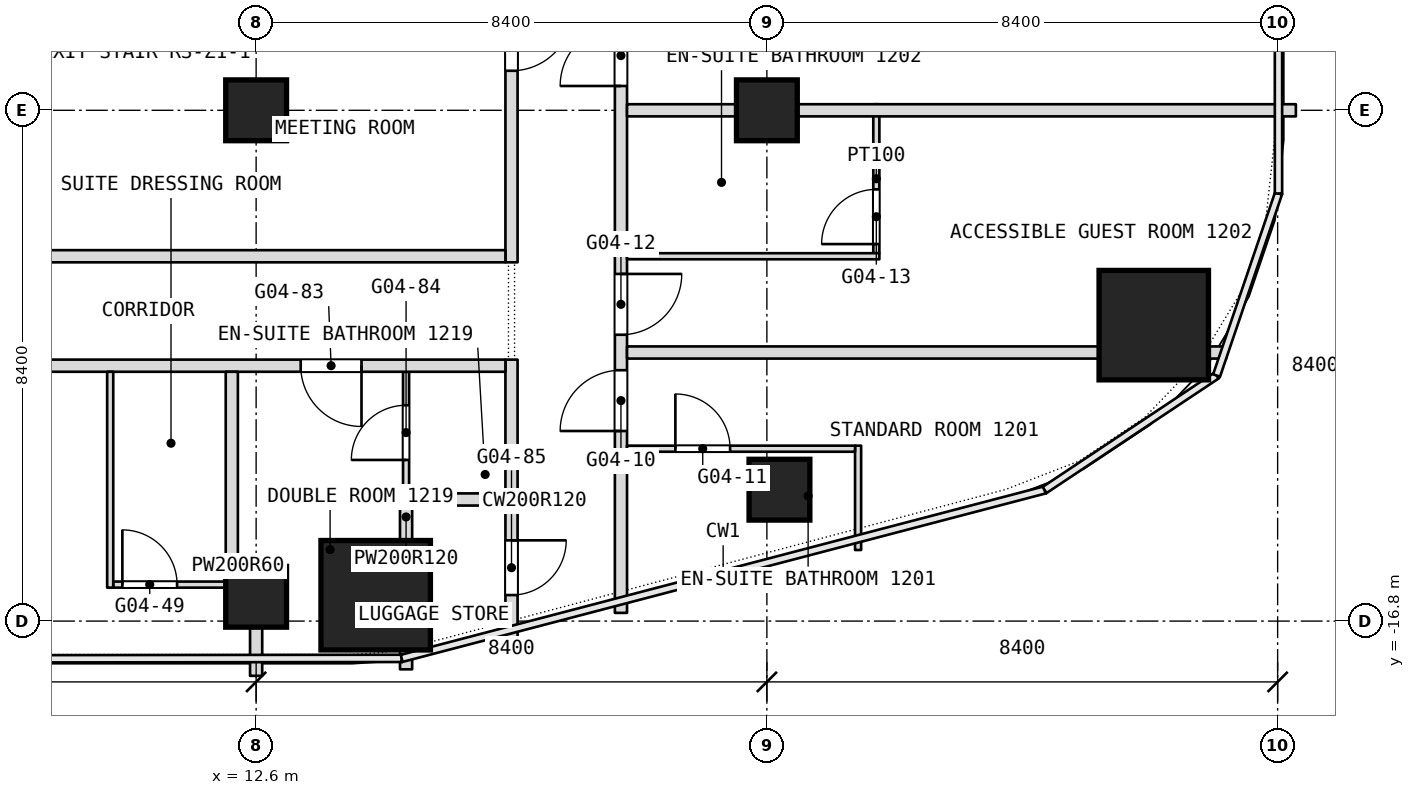
"""IFC4 building model, lengths in metres.
Left out: names, types, materials, properties, quantities, classifications, styles, units other than length and angle.
Written with IfcOpenShell. Run it as: python <this file> out.ifc"""

import sys

from ifc_helpers import new_model, si_unit, direction, frame, frame_2d, origin, origin_2d, place, context, subcontext, project, spatial, rectangle, extrude, element, fill, save


model = new_model("IFC4")
c1 = context("Model", 3, precision=1e-05, world=origin(), true_north=direction((0.0, 1.0)))
c2 = subcontext(c1, "Body", "Model", "MODEL_VIEW")
j1 = project(units=[si_unit("LENGTHUNIT", "METRE"), si_unit("PLANEANGLEUNIT", "RADIAN")], contexts=[c1])
p1 = place(None, origin())
s1 = spatial("IfcSite", under=j1, at=p1, CompositionType="ELEMENT")
p2 = place(p1, origin())
s2 = spatial("IfcBuilding", under=s1, at=p2, CompositionType="ELEMENT")
p3 = place(p2, frame((0.0, 0.0, 58.1)))
s3 = spatial("IfcBuildingStorey", under=s2, at=p3, CompositionType="ELEMENT", Elevation=58.1)
for number, where, z_axis, x_axis in (
    (1, (14.566, -16.375, 0.0), (0.0, 0.0, 1.0), (1.0, 0.0, 0.0)),
    (2, (27.363, -11.933, 0.0), (0.0, 0.0, 1.0), (1.0, 0.0, 0.0)),
):
    element("IfcColumn", number, at=place(p3, frame(where, z_axis=z_axis, x_axis=x_axis)), inside=s3, PredefinedType="COLUMN", context=c2, shape_type="SweptSolid", body=[
        extrude(rectangle(XDim=1.8, YDim=1.8, at=origin_2d()), origin(), (0.0, 0.0, 1.0), 3.6),
    ])
for number, where, z_axis, x_axis in (
    (3, (12.6, -8.4, 0.0), (0.0, 0.0, 1.0), (1.0, 0.0, 0.0)),
    (4, (21.0, -8.4, 0.0), (0.0, 0.0, 1.0), (1.0, 0.0, 0.0)),
    (5, (21.207, -14.639, 0.0), (0.0, 0.0, 1.0), (1.0, 0.0, 0.0)),
    (6, (12.6, -16.4, 0.0), (0.0, 0.0, 1.0), (1.0, 0.0, 0.0)),
):
    element("IfcColumn", number, at=place(p3, frame(where, z_axis=z_axis, x_axis=x_axis)), inside=s3, PredefinedType="COLUMN", context=c2, shape_type="SweptSolid", body=[
        extrude(rectangle(XDim=1.0, YDim=1.0, at=origin_2d()), origin(), (0.0, 0.0, 1.0), 3.6),
    ])
p4 = place(p3, frame((22.8, -10.75, 0.0), z_axis=(0.0, 0.0, 1.0), x_axis=(0.0, 1.0, 0.0)))
e7 = element("IfcWall", 7, at=p4, inside=s3, PredefinedType="PARTITIONING", context=c2, shape_type="SweptSolid", body=[
    extrude(rectangle(XDim=2.45, YDim=0.1, at=frame_2d((1.225, 0.0))), origin(), (0.0, 0.0, 1.0), 3.34),
])
p5 = place(p4, frame((0.15, 0.0, 0.0)))
e8 = element("IfcOpeningElement", 8, at=p5, cuts=e7, PredefinedType="OPENING", context=c2, shape_type="SweptSolid", body=[
    extrude(rectangle(XDim=0.9, YDim=2.1, at=frame_2d((0.45, 1.05))), frame((0.0, 0.05, 0.0), z_axis=(0.0, -1.0, 0.0), x_axis=(1.0, 0.0, 0.0)), (0.0, 0.0, 1.0), 0.1),
])
p6 = place(p3, frame((22.5, -15.631, 0.0), z_axis=(0.0, 0.0, 1.0), x_axis=(0.0, 1.0, 0.0)))
e9 = element("IfcWall", 9, at=p6, inside=s3, PredefinedType="PARTITIONING", context=c2, shape_type="SweptSolid", body=[
    extrude(rectangle(XDim=1.716, YDim=0.1, at=frame_2d((0.858, 0.0))), origin(), (0.0, 0.0, 1.0), 3.34),
])
p7 = place(p3, frame((18.6, -16.665, 0.0), z_axis=(0.0, 0.0, 1.0), x_axis=(0.0, 1.0, 0.0)))
e10 = element("IfcWall", 10, at=p7, inside=s3, PredefinedType="PARTITIONING", context=c2, shape_type="SweptSolid", body=[
    extrude(rectangle(XDim=50.205, YDim=0.2, at=frame_2d((25.103, 0.0))), origin(), (0.0, 0.0, 1.0), 3.34),
])
p8 = place(p7, frame((2.991, 0.0, 0.0)))
e11 = element("IfcOpeningElement", 11, at=p8, cuts=e10, PredefinedType="OPENING", context=c2, shape_type="SweptSolid", body=[
    extrude(rectangle(XDim=1.0, YDim=2.1, at=frame_2d((0.5, 1.05))), frame((0.0, 0.1, 0.0), z_axis=(0.0, -1.0, 0.0), x_axis=(1.0, 0.0, 0.0)), (0.0, 0.0, 1.0), 0.2),
])
p9 = place(p7, frame((4.574, 0.0, 0.0)))
e12 = element("IfcOpeningElement", 12, at=p9, cuts=e10, PredefinedType="OPENING", context=c2, shape_type="SweptSolid", body=[
    extrude(rectangle(XDim=1.0, YDim=2.1, at=frame_2d((0.5, 1.05))), frame((0.0, 0.1, 0.0), z_axis=(0.0, -1.0, 0.0), x_axis=(1.0, 0.0, 0.0)), (0.0, 0.0, 1.0), 0.2),
])
p10 = place(p7, frame((8.665, 0.0, 0.0)))
e13 = element("IfcOpeningElement", 13, at=p10, cuts=e10, PredefinedType="OPENING", context=c2, shape_type="SweptSolid", body=[
    extrude(rectangle(XDim=1.0, YDim=2.1, at=frame_2d((0.5, 1.05))), frame((0.0, 0.1, 0.0), z_axis=(0.0, -1.0, 0.0), x_axis=(1.0, 0.0, 0.0)), (0.0, 0.0, 1.0), 0.2),
])
p11 = place(p7, frame((15.265, 0.0, 0.0)))
e14 = element("IfcOpeningElement", 14, at=p11, cuts=e10, PredefinedType="OPENING", context=c2, shape_type="SweptSolid", body=[
    extrude(rectangle(XDim=1.0, YDim=2.1, at=frame_2d((0.5, 1.05))), frame((0.0, 0.1, 0.0), z_axis=(0.0, -1.0, 0.0), x_axis=(1.0, 0.0, 0.0)), (0.0, 0.0, 1.0), 0.2),
])
p12 = place(p7, frame((19.465, 0.0, 0.0)))
e15 = element("IfcOpeningElement", 15, at=p12, cuts=e10, PredefinedType="OPENING", context=c2, shape_type="SweptSolid", body=[
    extrude(rectangle(XDim=1.0, YDim=2.1, at=frame_2d((0.5, 1.05))), frame((0.0, 0.1, 0.0), z_axis=(0.0, -1.0, 0.0), x_axis=(1.0, 0.0, 0.0)), (0.0, 0.0, 1.0), 0.2),
])
p13 = place(p7, frame((21.265, 0.0, 0.0)))
e16 = element("IfcOpeningElement", 16, at=p13, cuts=e10, PredefinedType="OPENING", context=c2, shape_type="SweptSolid", body=[
    extrude(rectangle(XDim=1.0, YDim=2.1, at=frame_2d((0.5, 1.05))), frame((0.0, 0.1, 0.0), z_axis=(0.0, -1.0, 0.0), x_axis=(1.0, 0.0, 0.0)), (0.0, 0.0, 1.0), 0.2),
])
p14 = place(p7, frame((28.365, 0.0, 0.0)))
e17 = element("IfcOpeningElement", 17, at=p14, cuts=e10, PredefinedType="OPENING", context=c2, shape_type="SweptSolid", body=[
    extrude(rectangle(XDim=1.8, YDim=2.1, at=frame_2d((0.9, 1.05))), frame((0.0, 0.1, 0.0), z_axis=(0.0, -1.0, 0.0), x_axis=(1.0, 0.0, 0.0)), (0.0, 0.0, 1.0), 0.2),
])
p15 = place(p7, frame((37.165, 0.0, 0.0)))
e18 = element("IfcOpeningElement", 18, at=p15, cuts=e10, PredefinedType="OPENING", context=c2, shape_type="SweptSolid", body=[
    extrude(rectangle(XDim=1.1, YDim=2.1, at=frame_2d((0.55, 1.05))), frame((0.0, 0.1, 0.0), z_axis=(0.0, -1.0, 0.0), x_axis=(1.0, 0.0, 0.0)), (0.0, 0.0, 1.0), 0.2),
])
p16 = place(p7, frame((43.415, 0.0, 0.0)))
e19 = element("IfcOpeningElement", 19, at=p16, cuts=e10, PredefinedType="OPENING", context=c2, shape_type="SweptSolid", body=[
    extrude(rectangle(XDim=1.1, YDim=2.1, at=frame_2d((0.55, 1.05))), frame((0.0, 0.1, 0.0), z_axis=(0.0, -1.0, 0.0), x_axis=(1.0, 0.0, 0.0)), (0.0, 0.0, 1.0), 0.2),
])
p17 = place(p3, frame((16.8, -17.143, 0.0), z_axis=(0.0, 0.0, 1.0), x_axis=(0.0, 1.0, 0.0)))
e20 = element("IfcWall", 20, at=p17, inside=s3, PredefinedType="PARTITIONING", context=c2, shape_type="SweptSolid", body=[
    extrude(rectangle(XDim=4.643, YDim=0.2, at=frame_2d((2.322, 0.0))), origin(), (0.0, 0.0, 1.0), 3.34),
])
p18 = place(p17, frame((0.771, 0.0, 0.0)))
e21 = element("IfcOpeningElement", 21, at=p18, cuts=e20, PredefinedType="OPENING", context=c2, shape_type="SweptSolid", body=[
    extrude(rectangle(XDim=0.9, YDim=2.1, at=frame_2d((0.45, 1.05))), frame((0.0, 0.1, 0.0), z_axis=(0.0, -1.0, 0.0), x_axis=(1.0, 0.0, 0.0)), (0.0, 0.0, 1.0), 0.2),
])
p19 = place(p3, frame((16.8, -10.9, 0.0), z_axis=(0.0, 0.0, 1.0), x_axis=(0.0, 1.0, 0.0)))
e22 = element("IfcWall", 22, at=p19, inside=s3, PredefinedType="PARTITIONING", context=c2, shape_type="SweptSolid", body=[
    extrude(rectangle(XDim=7.3, YDim=0.2, at=frame_2d((3.65, 0.0))), origin(), (0.0, 0.0, 1.0), 3.34),
])
p20 = place(p19, frame((3.15, 0.0, 0.0)))
e23 = element("IfcOpeningElement", 23, at=p20, cuts=e22, PredefinedType="OPENING", context=c2, shape_type="SweptSolid", body=[
    extrude(rectangle(XDim=1.0, YDim=2.1, at=frame_2d((0.5, 1.05))), frame((0.0, 0.1, 0.0), z_axis=(0.0, -1.0, 0.0), x_axis=(1.0, 0.0, 0.0)), (0.0, 0.0, 1.0), 0.2),
])
p21 = place(p3, frame((10.25, -16.2, 0.0), z_axis=(0.0, 0.0, 1.0), x_axis=(1.0, 0.0, 0.0)))
e24 = element("IfcWall", 24, at=p21, inside=s3, PredefinedType="PARTITIONING", context=c2, shape_type="SweptSolid", body=[
    extrude(rectangle(XDim=2.45, YDim=0.1, at=frame_2d((1.225, 0.0))), origin(), (0.0, 0.0, 1.0), 3.34),
])
p22 = place(p21, frame((0.15, 0.0, 0.0)))
e25 = element("IfcOpeningElement", 25, at=p22, cuts=e24, PredefinedType="OPENING", context=c2, shape_type="SweptSolid", body=[
    extrude(rectangle(XDim=0.9, YDim=2.1, at=frame_2d((0.45, 1.05))), frame((0.0, 0.05, 0.0), z_axis=(0.0, -1.0, 0.0), x_axis=(1.0, 0.0, 0.0)), (0.0, 0.0, 1.0), 0.1),
])
p23 = place(p3, frame((12.1, -15.9, 0.0), z_axis=(0.0, 0.0, 1.0), x_axis=(1.0, 0.0, 0.0)))
e26 = element("IfcWall", 26, at=p23, inside=s3, PredefinedType="PARTITIONING", context=c2, shape_type="SweptSolid", body=[
    extrude(rectangle(XDim=0.4, YDim=0.2, at=frame_2d((0.2, 0.0))), origin(), (0.0, 0.0, 1.0), 3.34),
])
p24 = place(p3, frame((15.066, -17.593, 0.0), z_axis=(0.0, 0.0, 1.0), x_axis=(0.0, 1.0, 0.0)))
e27 = element("IfcWall", 27, at=p24, inside=s3, PredefinedType="PARTITIONING", context=c2, shape_type="SweptSolid", body=[
    extrude(rectangle(XDim=0.318, YDim=0.2, at=frame_2d((0.159, 0.0))), origin(), (0.0, 0.0, 1.0), 3.34),
])
p25 = place(p3, frame((15.066, -15.475, 0.0), z_axis=(0.0, 0.0, 1.0), x_axis=(0.0, 1.0, 0.0)))
e28 = element("IfcWall", 28, at=p25, inside=s3, PredefinedType="PARTITIONING", context=c2, shape_type="SweptSolid", body=[
    extrude(rectangle(XDim=0.775, YDim=0.2, at=frame_2d((0.388, 0.0))), origin(), (0.0, 0.0, 1.0), 3.34),
])
p26 = place(p3, frame((15.066, -14.9, 0.0), z_axis=(0.0, 0.0, 1.0), x_axis=(0.0, 1.0, 0.0)))
e29 = element("IfcWall", 29, at=p26, inside=s3, PredefinedType="PARTITIONING", context=c2, shape_type="SweptSolid", body=[
    extrude(rectangle(XDim=2.2, YDim=0.1, at=frame_2d((1.1, 0.0))), origin(), (0.0, 0.0, 1.0), 3.34),
])
p27 = place(p26, frame((0.75, 0.0, 0.0)))
e30 = element("IfcOpeningElement", 30, at=p27, cuts=e29, PredefinedType="OPENING", context=c2, shape_type="SweptSolid", body=[
    extrude(rectangle(XDim=0.9, YDim=2.1, at=frame_2d((0.45, 1.05))), frame((0.0, 0.05, 0.0), z_axis=(0.0, -1.0, 0.0), x_axis=(1.0, 0.0, 0.0)), (0.0, 0.0, 1.0), 0.1),
])
p28 = place(p3, frame((15.116, -14.8, 0.0), z_axis=(0.0, 0.0, 1.0), x_axis=(1.0, 0.0, 0.0)))
e31 = element("IfcWall", 31, at=p28, inside=s3, PredefinedType="PARTITIONING", context=c2, shape_type="SweptSolid", body=[
    extrude(rectangle(XDim=1.584, YDim=0.2, at=frame_2d((0.792, 0.0))), origin(), (0.0, 0.0, 1.0), 3.34),
])
p29 = place(p3, frame((18.7, -13.965, 0.0), z_axis=(0.0, 0.0, 1.0), x_axis=(1.0, 0.0, 0.0)))
e32 = element("IfcWall", 32, at=p29, inside=s3, PredefinedType="PARTITIONING", context=c2, shape_type="SweptSolid", body=[
    extrude(rectangle(XDim=3.75, YDim=0.1, at=frame_2d((1.875, 0.0))), origin(), (0.0, 0.0, 1.0), 3.34),
])
p30 = place(p29, frame((0.795, 0.0, 0.0)))
e33 = element("IfcOpeningElement", 33, at=p30, cuts=e32, PredefinedType="OPENING", context=c2, shape_type="SweptSolid", body=[
    extrude(rectangle(XDim=0.9, YDim=2.1, at=frame_2d((0.45, 1.05))), frame((0.0, 0.05, 0.0), z_axis=(0.0, -1.0, 0.0), x_axis=(1.0, 0.0, 0.0)), (0.0, 0.0, 1.0), 0.1),
])
p31 = place(p3, frame((12.6, -17.7, 0.0), z_axis=(0.0, 0.0, 1.0), x_axis=(0.0, 1.0, 0.0)))
e34 = element("IfcWall", 34, at=p31, inside=s3, PredefinedType="PARTITIONING", context=c2, shape_type="SweptSolid", body=[
    extrude(rectangle(XDim=1.9, YDim=0.2, at=frame_2d((0.95, 0.0))), origin(), (0.0, 0.0, 1.0), 3.34),
])
p32 = place(p3, frame((-16.7, -12.6, 0.0), z_axis=(0.0, 0.0, 1.0), x_axis=(1.0, 0.0, 0.0)))
e35 = element("IfcWall", 35, at=p32, inside=s3, PredefinedType="PARTITIONING", context=c2, shape_type="SweptSolid", body=[
    extrude(rectangle(XDim=33.4, YDim=0.2, at=frame_2d((16.7, 0.0))), origin(), (0.0, 0.0, 1.0), 3.34),
])
p33 = place(p32, frame((6.9, 0.0, 0.0)))
e36 = element("IfcOpeningElement", 36, at=p33, cuts=e35, PredefinedType="OPENING", context=c2, shape_type="SweptSolid", body=[
    extrude(rectangle(XDim=1.0, YDim=2.1, at=frame_2d((0.5, 1.05))), frame((0.0, 0.1, 0.0), z_axis=(0.0, -1.0, 0.0), x_axis=(1.0, 0.0, 0.0)), (0.0, 0.0, 1.0), 0.2),
])
p34 = place(p32, frame((8.7, 0.0, 0.0)))
e37 = element("IfcOpeningElement", 37, at=p34, cuts=e35, PredefinedType="OPENING", context=c2, shape_type="SweptSolid", body=[
    extrude(rectangle(XDim=1.0, YDim=2.1, at=frame_2d((0.5, 1.05))), frame((0.0, 0.1, 0.0), z_axis=(0.0, -1.0, 0.0), x_axis=(1.0, 0.0, 0.0)), (0.0, 0.0, 1.0), 0.2),
])
p35 = place(p32, frame((16.1, 0.0, 0.0)))
e38 = element("IfcOpeningElement", 38, at=p35, cuts=e35, PredefinedType="OPENING", context=c2, shape_type="SweptSolid", body=[
    extrude(rectangle(XDim=1.1, YDim=2.1, at=frame_2d((0.55, 1.05))), frame((0.0, 0.1, 0.0), z_axis=(0.0, -1.0, 0.0), x_axis=(1.0, 0.0, 0.0)), (0.0, 0.0, 1.0), 0.2),
])
p36 = place(p32, frame((24.6, 0.0, 0.0)))
e39 = element("IfcOpeningElement", 39, at=p36, cuts=e35, PredefinedType="OPENING", context=c2, shape_type="SweptSolid", body=[
    extrude(rectangle(XDim=1.1, YDim=2.1, at=frame_2d((0.55, 1.05))), frame((0.0, 0.1, 0.0), z_axis=(0.0, -1.0, 0.0), x_axis=(1.0, 0.0, 0.0)), (0.0, 0.0, 1.0), 0.2),
])
p37 = place(p32, frame((2.317, 0.0, 0.0)))
e40 = element("IfcOpeningElement", 40, at=p37, cuts=e35, PredefinedType="OPENING", context=c2, shape_type="SweptSolid", body=[
    extrude(rectangle(XDim=1.0, YDim=2.1, at=frame_2d((0.5, 1.05))), frame((0.0, 0.1, 0.0), z_axis=(0.0, -1.0, 0.0), x_axis=(1.0, 0.0, 0.0)), (0.0, 0.0, 1.0), 0.2),
])
p38 = place(p32, frame((30.033, 0.0, 0.0)))
e41 = element("IfcOpeningElement", 41, at=p38, cuts=e35, PredefinedType="OPENING", context=c2, shape_type="SweptSolid", body=[
    extrude(rectangle(XDim=1.0, YDim=2.1, at=frame_2d((0.5, 1.05))), frame((0.0, 0.1, 0.0), z_axis=(0.0, -1.0, 0.0), x_axis=(1.0, 0.0, 0.0)), (0.0, 0.0, 1.0), 0.2),
])
p39 = place(p3, frame((18.7, -12.383, 0.0), z_axis=(0.0, 0.0, 1.0), x_axis=(1.0, 0.0, 0.0)))
e42 = element("IfcWall", 42, at=p39, inside=s3, PredefinedType="PARTITIONING", context=c2, shape_type="SweptSolid", body=[
    extrude(rectangle(XDim=7.763, YDim=0.2, at=frame_2d((3.881, 0.0))), origin(), (0.0, 0.0, 1.0), 3.34),
])
p40 = place(p3, frame((28.263, -12.383, 0.0), z_axis=(0.0, 0.0, 1.0), x_axis=(1.0, 0.0, 0.0)))
e43 = element("IfcWall", 43, at=p40, inside=s3, PredefinedType="PARTITIONING", context=c2, shape_type="SweptSolid", body=[
    extrude(rectangle(XDim=0.29, YDim=0.2, at=frame_2d((0.145, 0.0))), origin(), (0.0, 0.0, 1.0), 3.34),
])
p41 = place(p3, frame((12.2, -15.8, 0.0), z_axis=(0.0, 0.0, 1.0), x_axis=(0.0, 1.0, 0.0)))
e44 = element("IfcWall", 44, at=p41, inside=s3, PredefinedType="PARTITIONING", context=c2, shape_type="SweptSolid", body=[
    extrude(rectangle(XDim=3.1, YDim=0.2, at=frame_2d((1.55, 0.0))), origin(), (0.0, 0.0, 1.0), 3.34),
])
p42 = place(p3, frame((-16.7, -10.8, 0.0), z_axis=(0.0, 0.0, 1.0), x_axis=(1.0, 0.0, 0.0)))
e45 = element("IfcWall", 45, at=p42, inside=s3, PredefinedType="PARTITIONING", context=c2, shape_type="SweptSolid", body=[
    extrude(rectangle(XDim=33.4, YDim=0.2, at=frame_2d((16.7, 0.0))), origin(), (0.0, 0.0, 1.0), 3.34),
])
p43 = place(p42, frame((5.7, 0.0, 0.0)))
e46 = element("IfcOpeningElement", 46, at=p43, cuts=e45, PredefinedType="OPENING", context=c2, shape_type="SweptSolid", body=[
    extrude(rectangle(XDim=1.0, YDim=2.1, at=frame_2d((0.5, 1.05))), frame((0.0, 0.1, 0.0), z_axis=(0.0, -1.0, 0.0), x_axis=(1.0, 0.0, 0.0)), (0.0, 0.0, 1.0), 0.2),
])
p44 = place(p42, frame((18.3, 0.0, 0.0)))
e47 = element("IfcOpeningElement", 47, at=p44, cuts=e45, PredefinedType="OPENING", context=c2, shape_type="SweptSolid", body=[
    extrude(rectangle(XDim=1.0, YDim=2.1, at=frame_2d((0.5, 1.05))), frame((0.0, 0.1, 0.0), z_axis=(0.0, -1.0, 0.0), x_axis=(1.0, 0.0, 0.0)), (0.0, 0.0, 1.0), 0.2),
])
p45 = place(p3, frame((18.7, -10.8, 0.0), z_axis=(0.0, 0.0, 1.0), x_axis=(1.0, 0.0, 0.0)))
e48 = element("IfcWall", 48, at=p45, inside=s3, PredefinedType="PARTITIONING", context=c2, shape_type="SweptSolid", body=[
    extrude(rectangle(XDim=4.15, YDim=0.1, at=frame_2d((2.075, 0.0))), origin(), (0.0, 0.0, 1.0), 3.34),
])
p46 = place(p3, frame((10.2, -16.25, 0.0), z_axis=(0.0, 0.0, 1.0), x_axis=(0.0, 1.0, 0.0)))
e49 = element("IfcWall", 49, at=p46, inside=s3, PredefinedType="PARTITIONING", context=c2, shape_type="SweptSolid", body=[
    extrude(rectangle(XDim=3.55, YDim=0.1, at=frame_2d((1.775, 0.0))), origin(), (0.0, 0.0, 1.0), 3.34),
])
p47 = place(p3, frame((18.7, -8.4, 0.0), z_axis=(0.0, 0.0, 1.0), x_axis=(1.0, 0.0, 0.0)))
e50 = element("IfcWall", 50, at=p47, inside=s3, PredefinedType="PARTITIONING", context=c2, shape_type="SweptSolid", body=[
    extrude(rectangle(XDim=11.0, YDim=0.2, at=frame_2d((5.5, 0.0))), origin(), (0.0, 0.0, 1.0), 2.84),
])
p48 = place(p5, origin())
e51 = element("IfcDoor", 51, at=p48, inside=s3, OperationType="SINGLE_SWING_LEFT", PredefinedType="DOOR", context=c2, shape_type="SweptSolid", body=[
    extrude(rectangle(XDim=0.9, YDim=2.1, at=frame_2d((0.45, 1.05))), frame((0.0, 0.025, 0.0), z_axis=(0.0, -1.0, 0.0), x_axis=(1.0, 0.0, 0.0)), (0.0, 0.0, 1.0), 0.05),
])
fill(e8, e51)
p49 = place(p8, origin())
e52 = element("IfcDoor", 52, at=p49, inside=s3, OperationType="SINGLE_SWING_RIGHT", PredefinedType="DOOR", context=c2, shape_type="SweptSolid", body=[
    extrude(rectangle(XDim=1.0, YDim=2.1, at=frame_2d((0.5, 1.05))), frame((0.0, 0.025, 0.0), z_axis=(0.0, -1.0, 0.0), x_axis=(1.0, 0.0, 0.0)), (0.0, 0.0, 1.0), 0.05),
])
fill(e11, e52)
p50 = place(p9, origin())
e53 = element("IfcDoor", 53, at=p50, inside=s3, OperationType="SINGLE_SWING_RIGHT", PredefinedType="DOOR", context=c2, shape_type="SweptSolid", body=[
    extrude(rectangle(XDim=1.0, YDim=2.1, at=frame_2d((0.5, 1.05))), frame((0.0, 0.025, 0.0), z_axis=(0.0, -1.0, 0.0), x_axis=(1.0, 0.0, 0.0)), (0.0, 0.0, 1.0), 0.05),
])
fill(e12, e53)
p51 = place(p10, origin())
e54 = element("IfcDoor", 54, at=p51, inside=s3, OperationType="SINGLE_SWING_RIGHT", PredefinedType="DOOR", context=c2, shape_type="SweptSolid", body=[
    extrude(rectangle(XDim=1.0, YDim=2.1, at=frame_2d((0.5, 1.05))), frame((0.0, 0.025, 0.0), z_axis=(0.0, -1.0, 0.0), x_axis=(1.0, 0.0, 0.0)), (0.0, 0.0, 1.0), 0.05),
])
fill(e13, e54)
p52 = place(p18, origin())
e55 = element("IfcDoor", 55, at=p52, inside=s3, OperationType="SINGLE_SWING_RIGHT", PredefinedType="DOOR", context=c2, shape_type="SweptSolid", body=[
    extrude(rectangle(XDim=0.9, YDim=2.1, at=frame_2d((0.45, 1.05))), frame((0.0, 0.025, 0.0), z_axis=(0.0, -1.0, 0.0), x_axis=(1.0, 0.0, 0.0)), (0.0, 0.0, 1.0), 0.05),
])
fill(e21, e55)
p53 = place(p20, origin())
e56 = element("IfcDoor", 56, at=p53, inside=s3, OperationType="SINGLE_SWING_RIGHT", PredefinedType="DOOR", context=c2, shape_type="SweptSolid", body=[
    extrude(rectangle(XDim=1.0, YDim=2.1, at=frame_2d((0.5, 1.05))), frame((0.0, 0.025, 0.0), z_axis=(0.0, -1.0, 0.0), x_axis=(1.0, 0.0, 0.0)), (0.0, 0.0, 1.0), 0.05),
])
fill(e23, e56)
p54 = place(p22, origin())
e57 = element("IfcDoor", 57, at=p54, inside=s3, OperationType="SINGLE_SWING_LEFT", PredefinedType="DOOR", context=c2, shape_type="SweptSolid", body=[
    extrude(rectangle(XDim=0.9, YDim=2.1, at=frame_2d((0.45, 1.05))), frame((0.0, 0.025, 0.0), z_axis=(0.0, -1.0, 0.0), x_axis=(1.0, 0.0, 0.0)), (0.0, 0.0, 1.0), 0.05),
])
fill(e25, e57)
p55 = place(p27, origin())
e58 = element("IfcDoor", 58, at=p55, inside=s3, OperationType="SINGLE_SWING_RIGHT", PredefinedType="DOOR", context=c2, shape_type="SweptSolid", body=[
    extrude(rectangle(XDim=0.9, YDim=2.1, at=frame_2d((0.45, 1.05))), frame((0.0, 0.025, 0.0), z_axis=(0.0, -1.0, 0.0), x_axis=(1.0, 0.0, 0.0)), (0.0, 0.0, 1.0), 0.05),
])
fill(e30, e58)
p56 = place(p30, origin())
e59 = element("IfcDoor", 59, at=p56, inside=s3, OperationType="SINGLE_SWING_LEFT", PredefinedType="DOOR", context=c2, shape_type="SweptSolid", body=[
    extrude(rectangle(XDim=0.9, YDim=2.1, at=frame_2d((0.45, 1.05))), frame((0.0, 0.025, 0.0), z_axis=(0.0, -1.0, 0.0), x_axis=(1.0, 0.0, 0.0)), (0.0, 0.0, 1.0), 0.05),
])
fill(e33, e59)
p57 = place(p38, origin())
e60 = element("IfcDoor", 60, at=p57, inside=s3, OperationType="SINGLE_SWING_LEFT", PredefinedType="DOOR", context=c2, shape_type="SweptSolid", body=[
    extrude(rectangle(XDim=1.0, YDim=2.1, at=frame_2d((0.5, 1.05))), frame((0.0, 0.025, 0.0), z_axis=(0.0, -1.0, 0.0), x_axis=(1.0, 0.0, 0.0)), (0.0, 0.0, 1.0), 0.05),
])
fill(e41, e60)
save(model, sys.argv[1])
